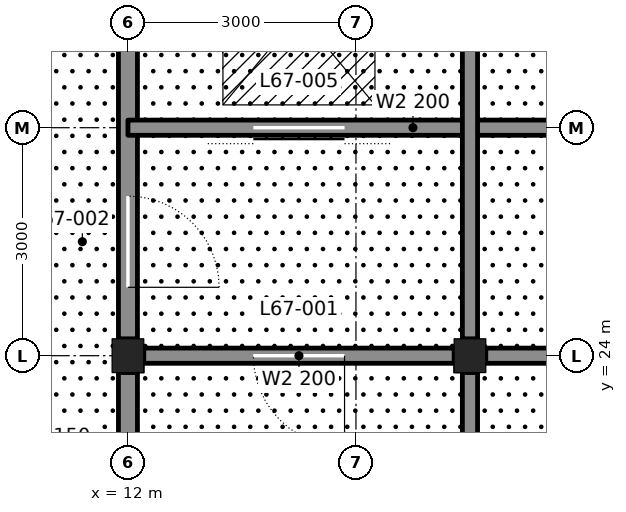
"""IFC4 building model, lengths in metres.
Left out: names, types, materials, properties, quantities, classifications, styles, units other than length and angle.
Written with IfcOpenShell. Run it as: python <this file> out.ifc"""

import sys

from ifc_helpers import new_model, si_unit, direction, frame, frame_2d, origin, origin_2d, place, context, subcontext, project, spatial, rectangle, i_section, extrude, element, fill, save


model = new_model("IFC4")
c1 = context("Model", 3, precision=1e-05, world=origin(), true_north=direction((0.0, 1.0)))
c2 = subcontext(c1, "Body", "Model", "MODEL_VIEW")
j1 = project(units=[si_unit("LENGTHUNIT", "METRE"), si_unit("PLANEANGLEUNIT", "RADIAN")], contexts=[c1])
p1 = place(None, origin())
s1 = spatial("IfcSite", under=j1, at=p1, CompositionType="ELEMENT")
p2 = place(p1, origin())
s2 = spatial("IfcBuilding", under=s1, at=p2, CompositionType="ELEMENT")
p3 = place(p2, frame((0.0, 0.0, 300.0)))
s3 = spatial("IfcBuildingStorey", under=s2, at=p3, CompositionType="ELEMENT", Elevation=300.0)
for number, where, z_axis, x_axis in (
    (1, (12.0, 24.0, 0.0), (0.0, 0.0, 1.0), (1.0, 0.0, 0.0)),
    (2, (16.5, 24.0, 0.0), (0.0, 0.0, 1.0), (1.0, 0.0, 0.0)),
):
    element("IfcColumn", number, at=place(p3, frame(where, z_axis=z_axis, x_axis=x_axis)), inside=s3, PredefinedType="COLUMN", context=c2, shape_type="SweptSolid", body=[
        extrude(i_section(OverallWidth=0.417, OverallDepth=0.445, WebThickness=0.039, FlangeThickness=0.063, at=origin_2d()), origin(), (0.0, 0.0, 1.0), 6.0),
    ])
p4 = place(p3, frame((12.0, 21.222, 0.0), z_axis=(0.0, 0.0, 1.0), x_axis=(0.0, 1.0, 0.0)))
e3 = element("IfcWall", 3, at=p4, inside=s3, PredefinedType="SOLIDWALL", context=c2, shape_type="SweptSolid", body=[
    extrude(rectangle(XDim=2.555, YDim=0.25, at=frame_2d((1.278, 0.0))), origin(), (0.0, 0.0, 1.0), 4.913),
])
p5 = place(p3, frame((12.0, 24.222, 0.0), z_axis=(0.0, 0.0, 1.0), x_axis=(0.0, 1.0, 0.0)))
e4 = element("IfcWall", 4, at=p5, inside=s3, PredefinedType="SOLIDWALL", context=c2, shape_type="SweptSolid", body=[
    extrude(rectangle(XDim=8.528, YDim=0.25, at=frame_2d((4.264, 0.0))), origin(), (0.0, 0.0, 1.0), 4.913),
])
p6 = place(p5, frame((0.678, 0.0, 0.0)))
e5 = element("IfcOpeningElement", 5, at=p6, cuts=e4, PredefinedType="OPENING", context=c2, shape_type="SweptSolid", body=[
    extrude(rectangle(XDim=1.2, YDim=2.1, at=frame_2d((0.6, 1.05))), frame((0.0, 0.135, 0.0), z_axis=(0.0, -1.0, 0.0), x_axis=(1.0, 0.0, 0.0)), (0.0, 0.0, 1.0), 0.27),
])
p7 = place(p5, frame((6.903, 0.0, 0.0)))
e6 = element("IfcOpeningElement", 6, at=p7, cuts=e4, PredefinedType="OPENING", context=c2, shape_type="SweptSolid", body=[
    extrude(rectangle(XDim=0.75, YDim=2.1, at=frame_2d((0.375, 1.05))), frame((0.0, 0.135, 0.0), z_axis=(0.0, -1.0, 0.0), x_axis=(1.0, 0.0, 0.0)), (0.0, 0.0, 1.0), 0.27),
])
p8 = place(p3, frame((12.208, 24.0, 0.0), z_axis=(0.0, 0.0, 1.0), x_axis=(1.0, 0.0, 0.0)))
e7 = element("IfcWall", 7, at=p8, inside=s3, PredefinedType="SOLIDWALL", context=c2, shape_type="SweptSolid", body=[
    extrude(rectangle(XDim=4.083, YDim=0.2, at=frame_2d((2.042, 0.0))), origin(), (0.0, 0.0, 1.0), 4.89),
])
p9 = place(p8, frame((1.442, 0.0, 0.0)))
e8 = element("IfcOpeningElement", 8, at=p9, cuts=e7, PredefinedType="OPENING", context=c2, shape_type="SweptSolid", body=[
    extrude(rectangle(XDim=1.2, YDim=2.1, at=frame_2d((0.6, 1.05))), frame((0.0, 0.11, 0.0), z_axis=(0.0, -1.0, 0.0), x_axis=(1.0, 0.0, 0.0)), (0.0, 0.0, 1.0), 0.22),
])
p10 = place(p3, frame((16.708, 24.0, 0.0), z_axis=(0.0, 0.0, 1.0), x_axis=(1.0, 0.0, 0.0)))
e9 = element("IfcWall", 9, at=p10, inside=s3, PredefinedType="SOLIDWALL", context=c2, shape_type="SweptSolid", body=[
    extrude(rectangle(XDim=2.792, YDim=0.2, at=frame_2d((1.396, 0.0))), origin(), (0.0, 0.0, 1.0), 4.89),
])
p11 = place(p3, frame((12.0, 27.0, 0.0), z_axis=(0.0, 0.0, 1.0), x_axis=(1.0, 0.0, 0.0)))
e10 = element("IfcWall", 10, at=p11, inside=s3, PredefinedType="SOLIDWALL", context=c2, shape_type="SweptSolid", body=[
    extrude(rectangle(XDim=7.5, YDim=0.2, at=frame_2d((3.75, 0.0))), origin(), (0.0, 0.0, 1.0), 5.84),
])
p12 = place(p11, frame((1.65, 0.0, 0.0)))
e11 = element("IfcOpeningElement", 11, at=p12, cuts=e10, PredefinedType="OPENING", context=c2, shape_type="SweptSolid", body=[
    extrude(rectangle(XDim=1.2, YDim=2.1, at=frame_2d((0.6, 1.05))), frame((0.0, 0.11, 0.0), z_axis=(0.0, -1.0, 0.0), x_axis=(1.0, 0.0, 0.0)), (0.0, 0.0, 1.0), 0.22),
])
p13 = place(p3, frame((16.5, 21.222, 0.0), z_axis=(0.0, 0.0, 1.0), x_axis=(0.0, 1.0, 0.0)))
e12 = element("IfcWall", 12, at=p13, inside=s3, PredefinedType="SOLIDWALL", context=c2, shape_type="SweptSolid", body=[
    extrude(rectangle(XDim=2.555, YDim=0.2, at=frame_2d((1.278, 0.0))), origin(), (0.0, 0.0, 1.0), 4.913),
])
p14 = place(p3, frame((16.5, 24.222, 0.0), z_axis=(0.0, 0.0, 1.0), x_axis=(0.0, 1.0, 0.0)))
e13 = element("IfcWall", 13, at=p14, inside=s3, PredefinedType="SOLIDWALL", context=c2, shape_type="SweptSolid", body=[
    extrude(rectangle(XDim=8.555, YDim=0.2, at=frame_2d((4.278, 0.0))), origin(), (0.0, 0.0, 1.0), 4.913),
])
p15 = place(p9, frame((1.2, 0.0, 0.0), z_axis=(0.0, 0.0, 1.0), x_axis=(-1.0, 0.0, 0.0)))
e14 = element("IfcDoor", 14, at=p15, inside=s3, OperationType="SINGLE_SWING_LEFT", PredefinedType="DOOR", context=c2, shape_type="SweptSolid", body=[
    extrude(rectangle(XDim=1.2, YDim=2.1, at=frame_2d((0.6, 1.05))), frame((0.0, 0.025, 0.0), z_axis=(0.0, -1.0, 0.0), x_axis=(1.0, 0.0, 0.0)), (0.0, 0.0, 1.0), 0.05),
])
fill(e8, e14)
p16 = place(p6, frame((1.2, 0.0, 0.0), z_axis=(0.0, 0.0, 1.0), x_axis=(-1.0, 0.0, 0.0)))
e15 = element("IfcDoor", 15, at=p16, inside=s3, OperationType="SINGLE_SWING_RIGHT", PredefinedType="DOOR", context=c2, shape_type="SweptSolid", body=[
    extrude(rectangle(XDim=1.2, YDim=2.1, at=frame_2d((0.6, 1.05))), frame((0.0, 0.025, 0.0), z_axis=(0.0, -1.0, 0.0), x_axis=(1.0, 0.0, 0.0)), (0.0, 0.0, 1.0), 0.05),
])
fill(e5, e15)
p17 = place(p12, origin())
e16 = element("IfcDoor", 16, at=p17, inside=s3, OperationType="DOUBLE_DOOR_SLIDING", PredefinedType="DOOR", context=c2, shape_type="SweptSolid", body=[
    extrude(rectangle(XDim=1.2, YDim=2.1, at=frame_2d((0.6, 1.05))), frame((0.0, 0.025, 0.0), z_axis=(0.0, -1.0, 0.0), x_axis=(1.0, 0.0, 0.0)), (0.0, 0.0, 1.0), 0.05),
])
fill(e11, e16)
save(model, sys.argv[1])
